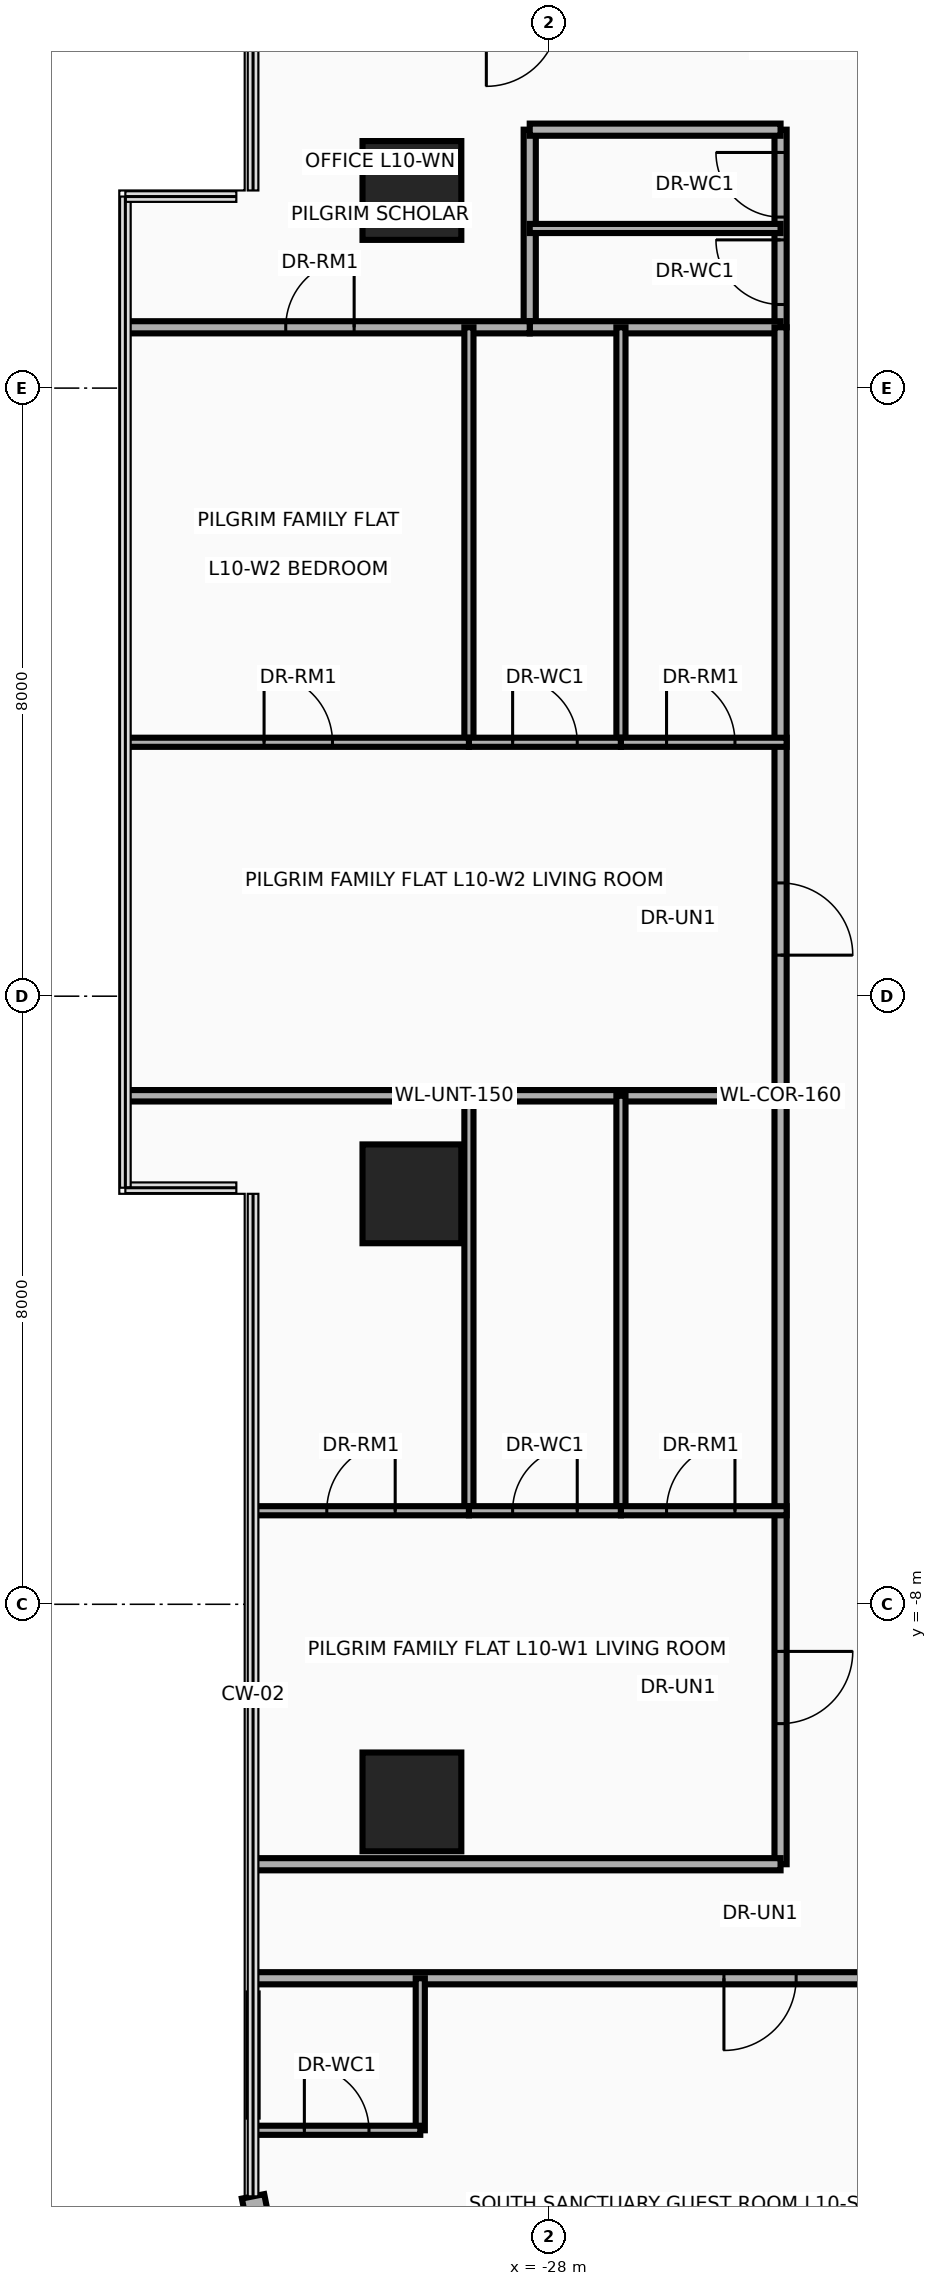
"""IFC4 building model, lengths in metres.
Left out: names, types, materials, properties, quantities, classifications, styles, units other than length and angle.
Written with IfcOpenShell. Run it as: python <this file> out.ifc"""

import sys

from ifc_helpers import new_model, si_unit, direction, frame, frame_2d, origin, origin_2d, place, context, subcontext, project, spatial, rectangle, circle, extrude, source, transform, mapped, element, fill, save


model = new_model("IFC4")
c1 = context("Model", 3, precision=1e-05, world=origin(), true_north=direction((0.0, 1.0)))
c2 = subcontext(c1, "Body", "Model", "MODEL_VIEW")
j1 = project(units=[si_unit("LENGTHUNIT", "METRE"), si_unit("PLANEANGLEUNIT", "RADIAN")], contexts=[c1])
p1 = place(None, origin())
s1 = spatial("IfcSite", under=j1, at=p1, CompositionType="ELEMENT")
p2 = place(p1, origin())
s2 = spatial("IfcBuilding", under=s1, at=p2, CompositionType="ELEMENT")
p3 = place(p2, frame((0.0, 0.0, 44.5)))
s3 = spatial("IfcBuildingStorey", under=s2, at=p3, CompositionType="ELEMENT", Elevation=44.5)
m1 = source(origin(), c2, "Body", "SweptSolid", [
    extrude(circle(Radius=0.65, at=origin_2d()), origin(), (0.0, 0.0, 1.0), 3.7),
])
for number, where, z_axis, x_axis in (
    (1, (-29.8, -10.6, 0.0), (0.0, 0.0, 1.0), (1.0, 0.0, 0.0)),
    (2, (-29.8, -2.6, 0.0), (0.0, 0.0, 1.0), (1.0, 0.0, 0.0)),
    (3, (-29.8, 10.6, 0.0), (0.0, 0.0, 1.0), (1.0, 0.0, 0.0)),
):
    element("IfcColumn", number, at=place(p3, frame(where, z_axis=z_axis, x_axis=x_axis)), inside=s3, PredefinedType="COLUMN", context=c2, shape_type="MappedRepresentation", body=[
        mapped(m1, transform((0.0, 0.0, 0.0), x_axis=(1.0, 0.0, 0.0), y_axis=(0.0, 1.0, 0.0), z_axis=(0.0, 0.0, 1.0), scale=1.0)),
    ])
p4 = place(p3, frame((-31.653, -16.982, 0.0), z_axis=(0.0, 0.0, 1.0), x_axis=(-0.194996050505, 0.980804027463, 0.0)))
e4 = element("IfcWall", 4, at=p4, inside=s3, PredefinedType="SOLIDWALL", context=c2, shape_type="SweptSolid", body=[
    extrude(rectangle(XDim=1.216, YDim=0.3, at=frame_2d((0.608, 0.0))), origin(), (0.0, 0.0, 1.0), 3.46),
])
p5 = place(p3, frame((-28.25, 8.8, 0.0), z_axis=(0.0, 0.0, 1.0), x_axis=(0.0, 1.0, 0.0)))
e5 = element("IfcWall", 5, at=p5, inside=s3, PredefinedType="PARTITIONING", context=c2, shape_type="SweptSolid", body=[
    extrude(rectangle(XDim=2.6, YDim=0.16, at=frame_2d((1.3, 0.0))), origin(), (0.0, 0.0, 1.0), 2.583),
])
p6 = place(p3, frame((-24.95, 8.8, 0.0), z_axis=(0.0, 0.0, 1.0), x_axis=(0.0, 1.0, 0.0)))
e6 = element("IfcWall", 6, at=p6, inside=s3, PredefinedType="PARTITIONING", context=c2, shape_type="SweptSolid", body=[
    extrude(rectangle(XDim=2.6, YDim=0.16, at=frame_2d((1.3, 0.0))), origin(), (0.0, 0.0, 1.0), 2.583),
])
p7 = place(p6, frame((0.3, 0.0, 0.0)))
e7 = element("IfcOpeningElement", 7, at=p7, cuts=e6, PredefinedType="OPENING", context=c2, shape_type="SweptSolid", body=[
    extrude(rectangle(XDim=0.85, YDim=2.1, at=frame_2d((0.425, 1.05))), frame((0.0, 0.095, 0.0), z_axis=(0.0, -1.0, 0.0), x_axis=(1.0, 0.0, 0.0)), (0.0, 0.0, 1.0), 0.19),
])
p8 = place(p6, frame((1.45, 0.0, 0.0)))
e8 = element("IfcOpeningElement", 8, at=p8, cuts=e6, PredefinedType="OPENING", context=c2, shape_type="SweptSolid", body=[
    extrude(rectangle(XDim=0.85, YDim=2.1, at=frame_2d((0.425, 1.05))), frame((0.0, 0.095, 0.0), z_axis=(0.0, -1.0, 0.0), x_axis=(1.0, 0.0, 0.0)), (0.0, 0.0, 1.0), 0.19),
])
for number, where, z_axis, x_axis in (
    (9, (-28.25, 8.8, 0.0), (0.0, 0.0, 1.0), (1.0, 0.0, 0.0)),
    (10, (-28.25, 11.4, 0.0), (0.0, 0.0, 1.0), (1.0, 0.0, 0.0)),
):
    element("IfcWall", number, at=place(p3, frame(where, z_axis=z_axis, x_axis=x_axis)), inside=s3, PredefinedType="PARTITIONING", context=c2, shape_type="SweptSolid", body=[
        extrude(rectangle(XDim=3.3, YDim=0.16, at=frame_2d((1.65, 0.0))), origin(), (0.0, 0.0, 1.0), 3.46),
    ])
p9 = place(p3, frame((-28.25, 10.1, 0.0), z_axis=(0.0, 0.0, 1.0), x_axis=(1.0, 0.0, 0.0)))
e11 = element("IfcWall", 11, at=p9, inside=s3, PredefinedType="PARTITIONING", context=c2, shape_type="SweptSolid", body=[
    extrude(rectangle(XDim=3.3, YDim=0.12, at=frame_2d((1.65, 0.0))), origin(), (0.0, 0.0, 1.0), 3.46),
])
p10 = place(p3, frame((-24.95, -11.42, 0.0), z_axis=(0.0, 0.0, 1.0), x_axis=(0.0, 1.0, 0.0)))
e12 = element("IfcWall", 12, at=p10, inside=s3, PredefinedType="PARTITIONING", context=c2, shape_type="SweptSolid", body=[
    extrude(rectangle(XDim=20.22, YDim=0.16, at=frame_2d((10.11, 0.0))), origin(), (0.0, 0.0, 1.0), 2.583),
])
p11 = place(p10, frame((1.85, 0.0, 0.0)))
e13 = element("IfcOpeningElement", 13, at=p11, cuts=e12, PredefinedType="OPENING", context=c2, shape_type="SweptSolid", body=[
    extrude(rectangle(XDim=0.95, YDim=2.15, at=frame_2d((0.475, 1.075))), frame((0.0, 0.095, 0.0), z_axis=(0.0, -1.0, 0.0), x_axis=(1.0, 0.0, 0.0)), (0.0, 0.0, 1.0), 0.19),
])
p12 = place(p10, frame((11.96, 0.0, 0.0)))
e14 = element("IfcOpeningElement", 14, at=p12, cuts=e12, PredefinedType="OPENING", context=c2, shape_type="SweptSolid", body=[
    extrude(rectangle(XDim=0.95, YDim=2.15, at=frame_2d((0.475, 1.075))), frame((0.0, 0.095, 0.0), z_axis=(0.0, -1.0, 0.0), x_axis=(1.0, 0.0, 0.0)), (0.0, 0.0, 1.0), 0.19),
])
p13 = place(p3, frame((-33.54, 8.8, 0.0), z_axis=(0.0, 0.0, 1.0), x_axis=(1.0, 0.0, 0.0)))
e15 = element("IfcWall", 15, at=p13, inside=s3, PredefinedType="PARTITIONING", context=c2, shape_type="SweptSolid", body=[
    extrude(rectangle(XDim=5.29, YDim=0.16, at=frame_2d((2.645, 0.0))), origin(), (0.0, 0.0, 1.0), 2.896),
])
p14 = place(p13, frame((2.08, 0.0, 0.0)))
e16 = element("IfcOpeningElement", 16, at=p14, cuts=e15, PredefinedType="OPENING", context=c2, shape_type="SweptSolid", body=[
    extrude(rectangle(XDim=0.9, YDim=2.1, at=frame_2d((0.45, 1.05))), frame((0.0, 0.095, 0.0), z_axis=(0.0, -1.0, 0.0), x_axis=(1.0, 0.0, 0.0)), (0.0, 0.0, 1.0), 0.19),
])
p15 = place(p3, frame((-33.54, -1.31, 0.0), z_axis=(0.0, 0.0, 1.0), x_axis=(1.0, 0.0, 0.0)))
e17 = element("IfcWall", 17, at=p15, inside=s3, PredefinedType="PARTITIONING", context=c2, shape_type="SweptSolid", body=[
    extrude(rectangle(XDim=8.59, YDim=0.15, at=frame_2d((4.295, 0.0))), origin(), (0.0, 0.0, 1.0), 2.896),
])
for number, where, z_axis, x_axis in (
    (18, (-27.05, -6.769, 0.0), (0.0, 0.0, 1.0), (0.0, 1.0, 0.0)),
    (19, (-29.05, -6.769, 0.0), (0.0, 0.0, 1.0), (0.0, 1.0, 0.0)),
):
    element("IfcWall", number, at=place(p3, frame(where, z_axis=z_axis, x_axis=x_axis)), inside=s3, PredefinedType="PARTITIONING", context=c2, shape_type="SweptSolid", body=[
        extrude(rectangle(XDim=5.459, YDim=0.12, at=frame_2d((2.729, 0.0))), origin(), (0.0, 0.0, 1.0), 2.583),
    ])
p16 = place(p3, frame((-29.05, -6.769, 0.0), z_axis=(0.0, 0.0, 1.0), x_axis=(1.0, 0.0, 0.0)))
e20 = element("IfcWall", 20, at=p16, inside=s3, PredefinedType="PARTITIONING", context=c2, shape_type="SweptSolid", body=[
    extrude(rectangle(XDim=2.0, YDim=0.12, at=frame_2d((1.0, 0.0))), origin(), (0.0, 0.0, 1.0), 2.979),
])
p17 = place(p16, frame((0.575, 0.0, 0.0)))
e21 = element("IfcOpeningElement", 21, at=p17, cuts=e20, PredefinedType="OPENING", context=c2, shape_type="SweptSolid", body=[
    extrude(rectangle(XDim=0.85, YDim=2.1, at=frame_2d((0.425, 1.05))), frame((0.0, 0.075, 0.0), z_axis=(0.0, -1.0, 0.0), x_axis=(1.0, 0.0, 0.0)), (0.0, 0.0, 1.0), 0.15),
])
p18 = place(p3, frame((-27.05, -6.769, 0.0), z_axis=(0.0, 0.0, 1.0), x_axis=(1.0, 0.0, 0.0)))
e22 = element("IfcWall", 22, at=p18, inside=s3, PredefinedType="PARTITIONING", context=c2, shape_type="SweptSolid", body=[
    extrude(rectangle(XDim=2.18, YDim=0.12, at=frame_2d((1.09, 0.0))), origin(), (0.0, 0.0, 1.0), 2.979),
])
p19 = place(p18, frame((0.6, 0.0, 0.0)))
e23 = element("IfcOpeningElement", 23, at=p19, cuts=e22, PredefinedType="OPENING", context=c2, shape_type="SweptSolid", body=[
    extrude(rectangle(XDim=0.9, YDim=2.1, at=frame_2d((0.45, 1.05))), frame((0.0, 0.075, 0.0), z_axis=(0.0, -1.0, 0.0), x_axis=(1.0, 0.0, 0.0)), (0.0, 0.0, 1.0), 0.15),
])
p20 = place(p3, frame((-31.89, -6.769, 0.0), z_axis=(0.0, 0.0, 1.0), x_axis=(1.0, 0.0, 0.0)))
e24 = element("IfcWall", 24, at=p20, inside=s3, PredefinedType="PARTITIONING", context=c2, shape_type="SweptSolid", body=[
    extrude(rectangle(XDim=2.84, YDim=0.12, at=frame_2d((1.42, 0.0))), origin(), (0.0, 0.0, 1.0), 2.896),
])
p21 = place(p20, frame((0.97, 0.0, 0.0)))
e25 = element("IfcOpeningElement", 25, at=p21, cuts=e24, PredefinedType="OPENING", context=c2, shape_type="SweptSolid", body=[
    extrude(rectangle(XDim=0.9, YDim=2.1, at=frame_2d((0.45, 1.05))), frame((0.0, 0.075, 0.0), z_axis=(0.0, -1.0, 0.0), x_axis=(1.0, 0.0, 0.0)), (0.0, 0.0, 1.0), 0.15),
])
for number, where, z_axis, x_axis in (
    (26, (-27.05, 3.341, 0.0), (0.0, 0.0, 1.0), (0.0, 1.0, 0.0)),
    (27, (-29.05, 3.341, 0.0), (0.0, 0.0, 1.0), (0.0, 1.0, 0.0)),
):
    element("IfcWall", number, at=place(p3, frame(where, z_axis=z_axis, x_axis=x_axis)), inside=s3, PredefinedType="PARTITIONING", context=c2, shape_type="SweptSolid", body=[
        extrude(rectangle(XDim=5.459, YDim=0.12, at=frame_2d((2.73, 0.0))), origin(), (0.0, 0.0, 1.0), 2.979),
    ])
p22 = place(p3, frame((-29.05, 3.341, 0.0), z_axis=(0.0, 0.0, 1.0), x_axis=(1.0, 0.0, 0.0)))
e28 = element("IfcWall", 28, at=p22, inside=s3, PredefinedType="PARTITIONING", context=c2, shape_type="SweptSolid", body=[
    extrude(rectangle(XDim=2.0, YDim=0.12, at=frame_2d((1.0, 0.0))), origin(), (0.0, 0.0, 1.0), 2.979),
])
p23 = place(p22, frame((0.575, 0.0, 0.0)))
e29 = element("IfcOpeningElement", 29, at=p23, cuts=e28, PredefinedType="OPENING", context=c2, shape_type="SweptSolid", body=[
    extrude(rectangle(XDim=0.85, YDim=2.1, at=frame_2d((0.425, 1.05))), frame((0.0, 0.075, 0.0), z_axis=(0.0, -1.0, 0.0), x_axis=(1.0, 0.0, 0.0)), (0.0, 0.0, 1.0), 0.15),
])
p24 = place(p3, frame((-27.05, 3.341, 0.0), z_axis=(0.0, 0.0, 1.0), x_axis=(1.0, 0.0, 0.0)))
e30 = element("IfcWall", 30, at=p24, inside=s3, PredefinedType="PARTITIONING", context=c2, shape_type="SweptSolid", body=[
    extrude(rectangle(XDim=2.18, YDim=0.12, at=frame_2d((1.09, 0.0))), origin(), (0.0, 0.0, 1.0), 2.979),
])
p25 = place(p24, frame((0.6, 0.0, 0.0)))
e31 = element("IfcOpeningElement", 31, at=p25, cuts=e30, PredefinedType="OPENING", context=c2, shape_type="SweptSolid", body=[
    extrude(rectangle(XDim=0.9, YDim=2.1, at=frame_2d((0.45, 1.05))), frame((0.0, 0.075, 0.0), z_axis=(0.0, -1.0, 0.0), x_axis=(1.0, 0.0, 0.0)), (0.0, 0.0, 1.0), 0.15),
])
p26 = place(p3, frame((-33.54, 3.341, 0.0), z_axis=(0.0, 0.0, 1.0), x_axis=(1.0, 0.0, 0.0)))
e32 = element("IfcWall", 32, at=p26, inside=s3, PredefinedType="PARTITIONING", context=c2, shape_type="SweptSolid", body=[
    extrude(rectangle(XDim=4.49, YDim=0.12, at=frame_2d((2.245, 0.0))), origin(), (0.0, 0.0, 1.0), 2.896),
])
p27 = place(p26, frame((1.795, 0.0, 0.0)))
e33 = element("IfcOpeningElement", 33, at=p27, cuts=e32, PredefinedType="OPENING", context=c2, shape_type="SweptSolid", body=[
    extrude(rectangle(XDim=0.9, YDim=2.1, at=frame_2d((0.45, 1.05))), frame((0.0, 0.075, 0.0), z_axis=(0.0, -1.0, 0.0), x_axis=(1.0, 0.0, 0.0)), (0.0, 0.0, 1.0), 0.15),
])
p28 = place(p3, frame((-31.89, -12.92, 0.0), z_axis=(0.0, 0.0, 1.0), x_axis=(1.0, 0.0, 0.0)))
e34 = element("IfcWall", 34, at=p28, inside=s3, PredefinedType="PARTITIONING", context=c2, shape_type="SweptSolid", body=[
    extrude(rectangle(XDim=22.28, YDim=0.16, at=frame_2d((11.14, 0.0))), origin(), (0.0, 0.0, 1.0), 2.834),
])
p29 = place(p28, frame((6.195, 0.0, 0.0)))
e35 = element("IfcOpeningElement", 35, at=p29, cuts=e34, PredefinedType="OPENING", context=c2, shape_type="SweptSolid", body=[
    extrude(rectangle(XDim=0.95, YDim=2.15, at=frame_2d((0.475, 1.075))), frame((0.0, 0.095, 0.0), z_axis=(0.0, -1.0, 0.0), x_axis=(1.0, 0.0, 0.0)), (0.0, 0.0, 1.0), 0.19),
])
p30 = place(p28, frame((17.335, 0.0, 0.0)))
e36 = element("IfcOpeningElement", 36, at=p30, cuts=e34, PredefinedType="OPENING", context=c2, shape_type="SweptSolid", body=[
    extrude(rectangle(XDim=0.95, YDim=2.15, at=frame_2d((0.475, 1.075))), frame((0.0, 0.095, 0.0), z_axis=(0.0, -1.0, 0.0), x_axis=(1.0, 0.0, 0.0)), (0.0, 0.0, 1.0), 0.19),
])
p31 = place(p3, frame((-29.69, -14.92, 0.0), z_axis=(0.0, 0.0, 1.0), x_axis=(0.0, 1.0, 0.0)))
e37 = element("IfcWall", 37, at=p31, inside=s3, PredefinedType="PARTITIONING", context=c2, shape_type="SweptSolid", body=[
    extrude(rectangle(XDim=2.0, YDim=0.12, at=frame_2d((1.0, 0.0))), origin(), (0.0, 0.0, 1.0), 3.46),
])
p32 = place(p3, frame((-31.89, -14.92, 0.0), z_axis=(0.0, 0.0, 1.0), x_axis=(1.0, 0.0, 0.0)))
e38 = element("IfcWall", 38, at=p32, inside=s3, PredefinedType="PARTITIONING", context=c2, shape_type="SweptSolid", body=[
    extrude(rectangle(XDim=2.2, YDim=0.12, at=frame_2d((1.1, 0.0))), origin(), (0.0, 0.0, 1.0), 3.46),
])
p33 = place(p32, frame((0.675, 0.0, 0.0)))
e39 = element("IfcOpeningElement", 39, at=p33, cuts=e38, PredefinedType="OPENING", context=c2, shape_type="SweptSolid", body=[
    extrude(rectangle(XDim=0.85, YDim=2.1, at=frame_2d((0.425, 1.05))), frame((0.0, 0.075, 0.0), z_axis=(0.0, -1.0, 0.0), x_axis=(1.0, 0.0, 0.0)), (0.0, 0.0, 1.0), 0.15),
])
p34 = place(p3, frame((-31.89, -14.74, 0.0), z_axis=(0.0, 0.0, 1.0), x_axis=(0.0, 1.0, 0.0)))
e40 = element("IfcWall", 40, at=p34, inside=s3, PredefinedType="PARTITIONING", context=c2, shape_type="SweptSolid", body=[
    extrude(rectangle(XDim=1.62, YDim=0.12, at=frame_2d((0.81, 0.0))), origin(), (0.0, 0.0, 1.0), 3.46),
])
p35 = place(p3, frame((-31.89, -11.42, 0.0), z_axis=(0.0, 0.0, 1.0), x_axis=(1.0, 0.0, 0.0)))
e41 = element("IfcWall", 41, at=p35, inside=s3, PredefinedType="PARTITIONING", context=c2, shape_type="SweptSolid", body=[
    extrude(rectangle(XDim=6.94, YDim=0.16, at=frame_2d((3.47, 0.0))), origin(), (0.0, 0.0, 1.0), 3.46),
])
p36 = place(p7, origin())
e42 = element("IfcDoor", 42, at=p36, inside=s3, OperationType="SINGLE_SWING_RIGHT", PredefinedType="DOOR", context=c2, shape_type="SweptSolid", body=[
    extrude(rectangle(XDim=0.85, YDim=2.1, at=frame_2d((0.425, 1.05))), frame((0.0, 0.025, 0.0), z_axis=(0.0, -1.0, 0.0), x_axis=(1.0, 0.0, 0.0)), (0.0, 0.0, 1.0), 0.05),
])
fill(e7, e42)
p37 = place(p8, origin())
e43 = element("IfcDoor", 43, at=p37, inside=s3, OperationType="SINGLE_SWING_LEFT", PredefinedType="DOOR", context=c2, shape_type="SweptSolid", body=[
    extrude(rectangle(XDim=0.85, YDim=2.1, at=frame_2d((0.425, 1.05))), frame((0.0, 0.025, 0.0), z_axis=(0.0, -1.0, 0.0), x_axis=(1.0, 0.0, 0.0)), (0.0, 0.0, 1.0), 0.05),
])
fill(e8, e43)
p38 = place(p14, origin())
e44 = element("IfcDoor", 44, at=p38, inside=s3, OperationType="SINGLE_SWING_RIGHT", PredefinedType="DOOR", context=c2, shape_type="SweptSolid", body=[
    extrude(rectangle(XDim=0.9, YDim=2.1, at=frame_2d((0.45, 1.05))), frame((0.0, 0.025, 0.0), z_axis=(0.0, -1.0, 0.0), x_axis=(1.0, 0.0, 0.0)), (0.0, 0.0, 1.0), 0.05),
])
fill(e16, e44)
p39 = place(p11, frame((0.95, 0.0, 0.0), z_axis=(0.0, 0.0, 1.0), x_axis=(-1.0, 0.0, 0.0)))
e45 = element("IfcDoor", 45, at=p39, inside=s3, OperationType="SINGLE_SWING_LEFT", PredefinedType="DOOR", context=c2, shape_type="SweptSolid", body=[
    extrude(rectangle(XDim=0.95, YDim=2.15, at=frame_2d((0.475, 1.075))), frame((0.0, 0.025, 0.0), z_axis=(0.0, -1.0, 0.0), x_axis=(1.0, 0.0, 0.0)), (0.0, 0.0, 1.0), 0.05),
])
fill(e13, e45)
p40 = place(p17, origin())
e46 = element("IfcDoor", 46, at=p40, inside=s3, OperationType="SINGLE_SWING_RIGHT", PredefinedType="DOOR", context=c2, shape_type="SweptSolid", body=[
    extrude(rectangle(XDim=0.85, YDim=2.1, at=frame_2d((0.425, 1.05))), frame((0.0, 0.025, 0.0), z_axis=(0.0, -1.0, 0.0), x_axis=(1.0, 0.0, 0.0)), (0.0, 0.0, 1.0), 0.05),
])
fill(e21, e46)
p41 = place(p19, origin())
e47 = element("IfcDoor", 47, at=p41, inside=s3, OperationType="SINGLE_SWING_LEFT", PredefinedType="DOOR", context=c2, shape_type="SweptSolid", body=[
    extrude(rectangle(XDim=0.9, YDim=2.1, at=frame_2d((0.45, 1.05))), frame((0.0, 0.025, 0.0), z_axis=(0.0, -1.0, 0.0), x_axis=(1.0, 0.0, 0.0)), (0.0, 0.0, 1.0), 0.05),
])
fill(e23, e47)
p42 = place(p21, origin())
e48 = element("IfcDoor", 48, at=p42, inside=s3, OperationType="SINGLE_SWING_RIGHT", PredefinedType="DOOR", context=c2, shape_type="SweptSolid", body=[
    extrude(rectangle(XDim=0.9, YDim=2.1, at=frame_2d((0.45, 1.05))), frame((0.0, 0.025, 0.0), z_axis=(0.0, -1.0, 0.0), x_axis=(1.0, 0.0, 0.0)), (0.0, 0.0, 1.0), 0.05),
])
fill(e25, e48)
p43 = place(p12, frame((0.95, 0.0, 0.0), z_axis=(0.0, 0.0, 1.0), x_axis=(-1.0, 0.0, 0.0)))
e49 = element("IfcDoor", 49, at=p43, inside=s3, OperationType="SINGLE_SWING_LEFT", PredefinedType="DOOR", context=c2, shape_type="SweptSolid", body=[
    extrude(rectangle(XDim=0.95, YDim=2.15, at=frame_2d((0.475, 1.075))), frame((0.0, 0.025, 0.0), z_axis=(0.0, -1.0, 0.0), x_axis=(1.0, 0.0, 0.0)), (0.0, 0.0, 1.0), 0.05),
])
fill(e14, e49)
p44 = place(p23, origin())
e50 = element("IfcDoor", 50, at=p44, inside=s3, OperationType="SINGLE_SWING_RIGHT", PredefinedType="DOOR", context=c2, shape_type="SweptSolid", body=[
    extrude(rectangle(XDim=0.85, YDim=2.1, at=frame_2d((0.425, 1.05))), frame((0.0, 0.025, 0.0), z_axis=(0.0, -1.0, 0.0), x_axis=(1.0, 0.0, 0.0)), (0.0, 0.0, 1.0), 0.05),
])
fill(e29, e50)
p45 = place(p25, origin())
e51 = element("IfcDoor", 51, at=p45, inside=s3, OperationType="SINGLE_SWING_LEFT", PredefinedType="DOOR", context=c2, shape_type="SweptSolid", body=[
    extrude(rectangle(XDim=0.9, YDim=2.1, at=frame_2d((0.45, 1.05))), frame((0.0, 0.025, 0.0), z_axis=(0.0, -1.0, 0.0), x_axis=(1.0, 0.0, 0.0)), (0.0, 0.0, 1.0), 0.05),
])
fill(e31, e51)
p46 = place(p27, origin())
e52 = element("IfcDoor", 52, at=p46, inside=s3, OperationType="SINGLE_SWING_RIGHT", PredefinedType="DOOR", context=c2, shape_type="SweptSolid", body=[
    extrude(rectangle(XDim=0.9, YDim=2.1, at=frame_2d((0.45, 1.05))), frame((0.0, 0.025, 0.0), z_axis=(0.0, -1.0, 0.0), x_axis=(1.0, 0.0, 0.0)), (0.0, 0.0, 1.0), 0.05),
])
fill(e33, e52)
p47 = place(p29, frame((0.95, 0.0, 0.0), z_axis=(0.0, 0.0, 1.0), x_axis=(-1.0, 0.0, 0.0)))
e53 = element("IfcDoor", 53, at=p47, inside=s3, OperationType="SINGLE_SWING_LEFT", PredefinedType="DOOR", context=c2, shape_type="SweptSolid", body=[
    extrude(rectangle(XDim=0.95, YDim=2.15, at=frame_2d((0.475, 1.075))), frame((0.0, 0.025, 0.0), z_axis=(0.0, -1.0, 0.0), x_axis=(1.0, 0.0, 0.0)), (0.0, 0.0, 1.0), 0.05),
])
fill(e35, e53)
p48 = place(p33, origin())
e54 = element("IfcDoor", 54, at=p48, inside=s3, OperationType="SINGLE_SWING_RIGHT", PredefinedType="DOOR", context=c2, shape_type="SweptSolid", body=[
    extrude(rectangle(XDim=0.85, YDim=2.1, at=frame_2d((0.425, 1.05))), frame((0.0, 0.025, 0.0), z_axis=(0.0, -1.0, 0.0), x_axis=(1.0, 0.0, 0.0)), (0.0, 0.0, 1.0), 0.05),
])
fill(e39, e54)
save(model, sys.argv[1])
